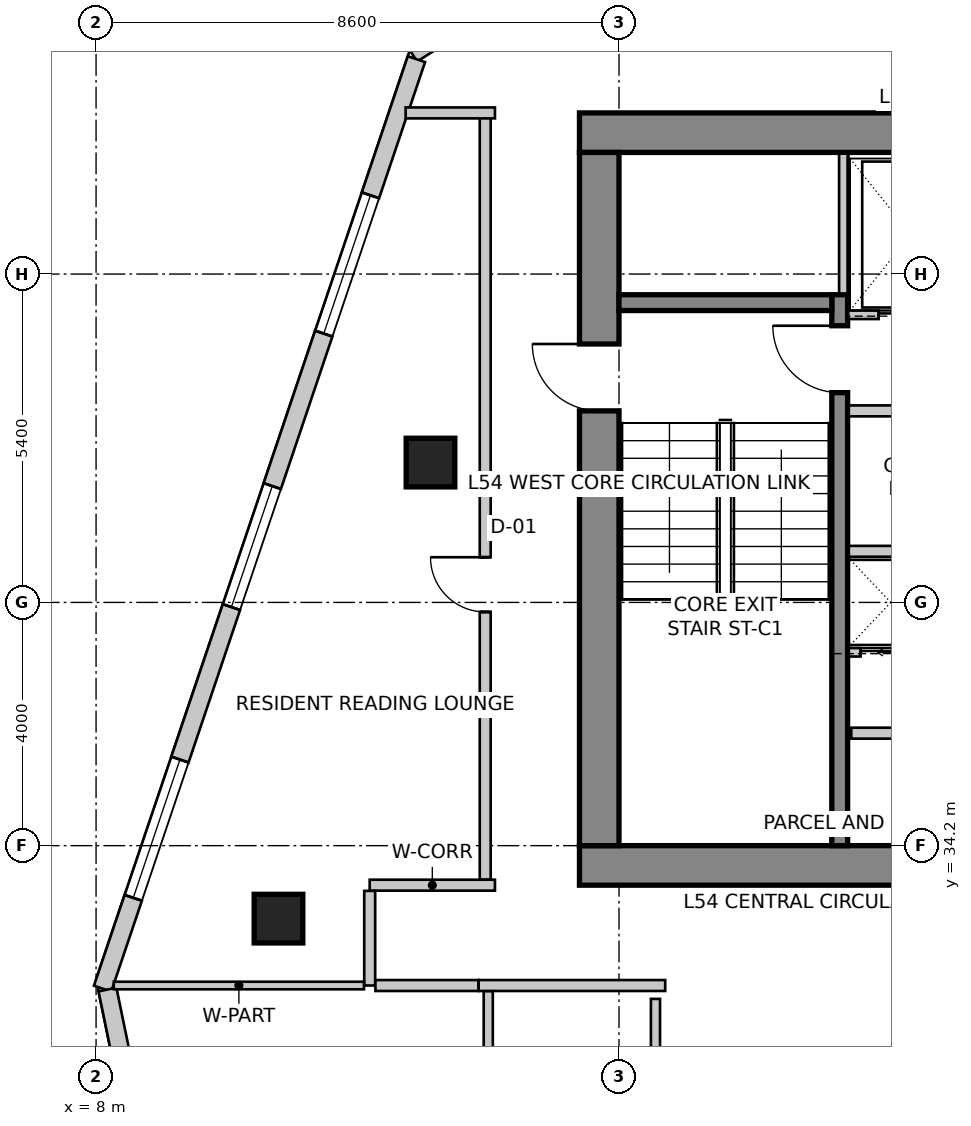
"""IFC4 building model, lengths in metres.
Left out: names, types, materials, properties, quantities, classifications, styles, units other than length and angle.
Written with IfcOpenShell. Run it as: python <this file> out.ifc"""

import sys

from ifc_helpers import new_model, si_unit, direction, frame, frame_2d, origin, origin_2d, place, context, subcontext, project, spatial, rectangle, extrude, source, transform, mapped, element, fill, save


model = new_model("IFC4")
c1 = context("Model", 3, precision=1e-05, world=origin(), true_north=direction((0.0, 1.0)))
c2 = subcontext(c1, "Body", "Model", "MODEL_VIEW")
j1 = project(units=[si_unit("LENGTHUNIT", "METRE"), si_unit("PLANEANGLEUNIT", "RADIAN")], contexts=[c1])
p1 = place(None, origin())
s1 = spatial("IfcSite", under=j1, at=p1, CompositionType="ELEMENT")
p2 = place(p1, origin())
s2 = spatial("IfcBuilding", under=s1, at=p2, CompositionType="ELEMENT")
p3 = place(p2, frame((0.0, 0.0, 214.9)))
s3 = spatial("IfcBuildingStorey", under=s2, at=p3, CompositionType="ELEMENT", Elevation=214.9)
p4 = place(p3, frame((15.95, 45.925, 0.0), z_axis=(0.0, 0.0, 1.0), x_axis=(1.0, 0.0, 0.0)))
e1 = element("IfcWall", 1, at=p4, inside=s3, PredefinedType="SHEAR", context=c2, shape_type="SweptSolid", body=[
    extrude(rectangle(XDim=15.7, YDim=0.65, at=frame_2d((7.85, 0.0))), origin(), (0.0, 0.0, 1.0), 3.5),
])
p5 = place(p3, frame((15.95, 33.875, 0.0), z_axis=(0.0, 0.0, 1.0), x_axis=(1.0, 0.0, 0.0)))
e2 = element("IfcWall", 2, at=p5, inside=s3, PredefinedType="SHEAR", context=c2, shape_type="SweptSolid", body=[
    extrude(rectangle(XDim=15.7, YDim=0.65, at=frame_2d((7.85, 0.0))), origin(), (0.0, 0.0, 1.0), 3.5),
])
m1 = source(origin(), c2, "Body", "SweptSolid", [
    extrude(rectangle(XDim=1.1, YDim=2.15, at=frame_2d((0.55, 1.075))), frame((0.0, 0.335, 0.0), z_axis=(0.0, -1.0, 0.0), x_axis=(1.0, 0.0, 0.0)), (0.0, 0.0, 1.0), 0.67),
])
p6 = place(p5, frame((10.08, 0.0, 0.0)))
e3 = element("IfcOpeningElement", 3, at=p6, cuts=e2, PredefinedType="OPENING", context=c2, shape_type="MappedRepresentation", body=[
    mapped(m1, transform((0.0, 0.0, 0.0), scale=1.0)),
])
p7 = place(p3, frame((16.275, 34.2, 0.0), z_axis=(0.0, 0.0, 1.0), x_axis=(0.0, 1.0, 0.0)))
e4 = element("IfcWall", 4, at=p7, inside=s3, PredefinedType="SHEAR", context=c2, shape_type="SweptSolid", body=[
    extrude(rectangle(XDim=11.4, YDim=0.65, at=frame_2d((5.7, 0.0))), origin(), (0.0, 0.0, 1.0), 3.5),
])
p8 = place(p7, frame((7.15, 0.0, 0.0)))
e5 = element("IfcOpeningElement", 5, at=p8, cuts=e4, PredefinedType="OPENING", context=c2, shape_type="MappedRepresentation", body=[
    mapped(m1, transform((0.0, 0.0, 0.0), scale=1.0)),
])
p9 = place(p3, frame((20.23, 34.2, 0.0), z_axis=(0.0, 0.0, 1.0), x_axis=(0.0, 1.0, 0.0)))
e6 = element("IfcWall", 6, at=p9, inside=s3, PredefinedType="SHEAR", context=c2, shape_type="SweptSolid", body=[
    extrude(rectangle(XDim=9.06, YDim=0.26, at=frame_2d((4.53, 0.0))), origin(), (0.0, 0.0, 1.0), 3.5),
])
m2 = source(origin(), c2, "Body", "SweptSolid", [
    extrude(rectangle(XDim=1.1, YDim=2.15, at=frame_2d((0.55, 1.075))), frame((0.0, 0.14, 0.0), z_axis=(0.0, -1.0, 0.0), x_axis=(1.0, 0.0, 0.0)), (0.0, 0.0, 1.0), 0.28),
])
p10 = place(p9, frame((7.45, 0.0, 0.0)))
e7 = element("IfcOpeningElement", 7, at=p10, cuts=e6, PredefinedType="OPENING", context=c2, shape_type="MappedRepresentation", body=[
    mapped(m2, transform((0.0, 0.0, 0.0), scale=1.0)),
])
p11 = place(p3, frame((16.6, 43.13, 0.0), z_axis=(0.0, 0.0, 1.0), x_axis=(1.0, 0.0, 0.0)))
e8 = element("IfcWall", 8, at=p11, inside=s3, PredefinedType="SHEAR", context=c2, shape_type="SweptSolid", body=[
    extrude(rectangle(XDim=3.5, YDim=0.26, at=frame_2d((1.75, 0.0))), origin(), (0.0, 0.0, 1.0), 3.5),
])
m3 = source(origin(), c2, "Body", "SweptSolid", [
    extrude(rectangle(XDim=0.8, YDim=0.8, at=origin_2d()), origin(), (0.0, 0.0, 1.0), 3.5),
])
for number, where, z_axis, x_axis in (
    (9, (11.0, 33.0, 0.0), (0.0, 0.0, 1.0), (1.0, 0.0, 0.0)),
    (10, (13.5, 40.5, 0.0), (0.0, 0.0, 1.0), (1.0, 0.0, 0.0)),
):
    element("IfcColumn", number, at=place(p3, frame(where, z_axis=z_axis, x_axis=x_axis)), inside=s3, PredefinedType="COLUMN", context=c2, shape_type="MappedRepresentation", body=[
        mapped(m3, transform((0.0, 0.0, 0.0), scale=1.0)),
    ])
p12 = place(p3, frame((21.874, 52.742, 0.0), z_axis=(0.0, 0.0, 1.0), x_axis=(-0.84365659959, -0.536883173482, 0.0)))
e11 = element("IfcWall", 11, at=p12, inside=s3, PredefinedType="SOLIDWALL", context=c2, shape_type="SweptSolid", body=[
    extrude(rectangle(XDim=10.283, YDim=0.3, at=frame_2d((5.142, 0.0))), origin(), (0.0, 0.0, 1.0), 3.25),
])
m4 = source(origin(), c2, "Body", "SweptSolid", [
    extrude(rectangle(XDim=2.1, YDim=2.0, at=frame_2d((1.05, 1.0))), frame((0.0, 0.16, 0.0), z_axis=(0.0, -1.0, 0.0), x_axis=(1.0, 0.0, 0.0)), (0.0, 0.0, 1.0), 0.32),
])
p13 = place(p12, frame((3.457, 0.0, 0.85)))
e12 = element("IfcOpeningElement", 12, at=p13, cuts=e11, PredefinedType="OPENING", context=c2, shape_type="MappedRepresentation", body=[
    mapped(m4, transform((0.0, 0.0, 0.0), scale=1.0)),
])
p14 = place(p3, frame((13.269, 47.134, 0.0), z_axis=(0.0, 0.0, 1.0), x_axis=(-0.319920776449, -0.947444297464, 0.0)))
e13 = element("IfcWall", 13, at=p14, inside=s3, PredefinedType="SOLIDWALL", context=c2, shape_type="SweptSolid", body=[
    extrude(rectangle(XDim=16.133, YDim=0.3, at=frame_2d((8.067, 0.0))), origin(), (0.0, 0.0, 1.0), 3.25),
])
m5 = source(origin(), c2, "Body", "SweptSolid", [
    extrude(rectangle(XDim=2.4, YDim=2.2, at=frame_2d((1.2, 1.1))), frame((0.0, 0.16, 0.0), z_axis=(0.0, -1.0, 0.0), x_axis=(1.0, 0.0, 0.0)), (0.0, 0.0, 1.0), 0.32),
])
p15 = place(p14, frame((2.363, 0.0, 0.85)))
e14 = element("IfcOpeningElement", 14, at=p15, cuts=e13, PredefinedType="OPENING", context=c2, shape_type="MappedRepresentation", body=[
    mapped(m5, transform((0.0, 0.0, 0.0), scale=1.0)),
])
p16 = place(p14, frame((7.41, 0.0, 0.85)))
e15 = element("IfcOpeningElement", 15, at=p16, cuts=e13, PredefinedType="OPENING", context=c2, shape_type="MappedRepresentation", body=[
    mapped(m4, transform((0.0, 0.0, 0.0), scale=1.0)),
])
p17 = place(p14, frame((12.157, 0.0, 0.85)))
e16 = element("IfcOpeningElement", 16, at=p17, cuts=e13, PredefinedType="OPENING", context=c2, shape_type="MappedRepresentation", body=[
    mapped(m5, transform((0.0, 0.0, 0.0), scale=1.0)),
])
p18 = place(p3, frame((8.188, 31.834, 0.0), z_axis=(0.0, 0.0, 1.0), x_axis=(0.202303475707, -0.979322880217, 0.0)))
e17 = element("IfcWall", 17, at=p18, inside=s3, PredefinedType="SOLIDWALL", context=c2, shape_type="SweptSolid", body=[
    extrude(rectangle(XDim=15.766, YDim=0.3, at=frame_2d((7.883, 0.0))), origin(), (0.0, 0.0, 1.0), 3.25),
])
p19 = place(p18, frame((1.407, 0.0, 0.85)))
e18 = element("IfcOpeningElement", 18, at=p19, cuts=e17, PredefinedType="OPENING", context=c2, shape_type="MappedRepresentation", body=[
    mapped(m4, transform((0.0, 0.0, 0.0), scale=1.0)),
])
p20 = place(p18, frame((6.194, 0.0, 0.85)))
e19 = element("IfcOpeningElement", 19, at=p20, cuts=e17, PredefinedType="OPENING", context=c2, shape_type="MappedRepresentation", body=[
    mapped(m4, transform((0.0, 0.0, 0.0), scale=1.0)),
])
p21 = place(p18, frame((11.054, 0.0, 0.85)))
e20 = element("IfcOpeningElement", 20, at=p21, cuts=e17, PredefinedType="OPENING", context=c2, shape_type="MappedRepresentation", body=[
    mapped(m4, transform((0.0, 0.0, 0.0), scale=1.0)),
])
p22 = place(p3, frame((20.37, 42.93, 0.0), z_axis=(0.0, 0.0, 1.0), x_axis=(1.0, 0.0, 0.0)))
e21 = element("IfcWall", 21, at=p22, inside=s3, PredefinedType="SOLIDWALL", context=c2, shape_type="SweptSolid", body=[
    extrude(rectangle(XDim=6.86, YDim=0.14, at=frame_2d((3.43, 0.0))), origin(), (0.0, 0.0, 1.0), 3.25),
])
m6 = source(origin(), c2, "Body", "SweptSolid", [
    extrude(rectangle(XDim=1.1, YDim=2.15, at=frame_2d((0.55, 1.075))), frame((0.0, 0.08, 0.0), z_axis=(0.0, -1.0, 0.0), x_axis=(1.0, 0.0, 0.0)), (0.0, 0.0, 1.0), 0.16),
])
p23 = place(p22, frame((0.5, 0.0, 0.0)))
e22 = element("IfcOpeningElement", 22, at=p23, cuts=e21, PredefinedType="OPENING", context=c2, shape_type="MappedRepresentation", body=[
    mapped(m6, transform((0.0, 0.0, 0.0), scale=1.0)),
])
p24 = place(p22, frame((2.7, 0.0, 0.0)))
e23 = element("IfcOpeningElement", 23, at=p24, cuts=e21, PredefinedType="OPENING", context=c2, shape_type="MappedRepresentation", body=[
    mapped(m6, transform((0.0, 0.0, 0.0), scale=1.0)),
])
p25 = place(p22, frame((5.1, 0.0, 0.0)))
e24 = element("IfcOpeningElement", 24, at=p25, cuts=e21, PredefinedType="OPENING", context=c2, shape_type="MappedRepresentation", body=[
    mapped(m6, transform((0.0, 0.0, 0.0), scale=1.0)),
])
p26 = place(p3, frame((20.29, 43.28, 0.0), z_axis=(0.0, 0.0, 1.0), x_axis=(0.0, 1.0, 0.0)))
e25 = element("IfcWall", 25, at=p26, inside=s3, PredefinedType="SOLIDWALL", context=c2, shape_type="SweptSolid", body=[
    extrude(rectangle(XDim=2.3, YDim=0.14, at=frame_2d((1.15, 0.0))), origin(), (0.0, 0.0, 1.0), 3.25),
])
p27 = place(p3, frame((20.38, 37.38, 0.0), z_axis=(0.0, 0.0, 1.0), x_axis=(1.0, 0.0, 0.0)))
e26 = element("IfcWall", 26, at=p27, inside=s3, PredefinedType="SOLIDWALL", context=c2, shape_type="SweptSolid", body=[
    extrude(rectangle(XDim=5.75, YDim=0.14, at=frame_2d((2.875, 0.0))), origin(), (0.0, 0.0, 1.0), 3.25),
])
m7 = source(origin(), c2, "Body", "SweptSolid", [
    extrude(rectangle(XDim=1.0, YDim=2.15, at=frame_2d((0.5, 1.075))), frame((0.0, 0.08, 0.0), z_axis=(0.0, -1.0, 0.0), x_axis=(1.0, 0.0, 0.0)), (0.0, 0.0, 1.0), 0.16),
])
p28 = place(p27, frame((0.19, 0.0, 0.0)))
e27 = element("IfcOpeningElement", 27, at=p28, cuts=e26, PredefinedType="OPENING", context=c2, shape_type="MappedRepresentation", body=[
    mapped(m7, transform((0.0, 0.0, 0.0), scale=1.0)),
])
p29 = place(p3, frame((20.38, 39.04, 0.0), z_axis=(0.0, 0.0, 1.0), x_axis=(1.0, 0.0, 0.0)))
e28 = element("IfcWall", 28, at=p29, inside=s3, PredefinedType="SOLIDWALL", context=c2, shape_type="SweptSolid", body=[
    extrude(rectangle(XDim=5.75, YDim=0.18, at=frame_2d((2.875, 0.0))), origin(), (0.0, 0.0, 1.0), 3.25),
])
p30 = place(p3, frame((24.81, 41.35, 0.0), z_axis=(0.0, 0.0, 1.0), x_axis=(-1.0, 0.0, 0.0)))
e29 = element("IfcWall", 29, at=p30, inside=s3, PredefinedType="PARTITIONING", context=c2, shape_type="SweptSolid", body=[
    extrude(rectangle(XDim=4.43, YDim=0.18, at=frame_2d((2.215, 0.0))), origin(), (0.0, 0.0, 1.0), 3.25),
])
p31 = place(p3, frame((20.42, 36.05, 0.0), z_axis=(0.0, 0.0, 1.0), x_axis=(1.0, 0.0, 0.0)))
e30 = element("IfcWall", 30, at=p31, inside=s3, PredefinedType="PARTITIONING", context=c2, shape_type="SweptSolid", body=[
    extrude(rectangle(XDim=5.46, YDim=0.18, at=frame_2d((2.73, 0.0))), origin(), (0.0, 0.0, 1.0), 3.25),
])
m8 = source(origin(), c2, "Body", "SweptSolid", [
    extrude(rectangle(XDim=0.9, YDim=2.15, at=frame_2d((0.45, 1.075))), frame((0.0, 0.1, 0.0), z_axis=(0.0, -1.0, 0.0), x_axis=(1.0, 0.0, 0.0)), (0.0, 0.0, 1.0), 0.2),
])
p32 = place(p31, frame((2.219, 0.0, 0.0)))
e31 = element("IfcOpeningElement", 31, at=p32, cuts=e30, PredefinedType="OPENING", context=c2, shape_type="MappedRepresentation", body=[
    mapped(m8, transform((0.0, 0.0, 0.0), scale=1.0)),
])
p33 = place(p3, frame((12.5, 33.55, 0.0), z_axis=(0.0, 0.0, 1.0), x_axis=(1.0, 0.0, 0.0)))
e32 = element("IfcWall", 32, at=p33, inside=s3, PredefinedType="PARTITIONING", context=c2, shape_type="SweptSolid", body=[
    extrude(rectangle(XDim=2.06, YDim=0.18, at=frame_2d((1.03, 0.0))), origin(), (0.0, 0.0, 1.0), 3.25),
])
p34 = place(p3, frame((12.5, 31.9, 0.0), z_axis=(0.0, 0.0, 1.0), x_axis=(0.0, 1.0, 0.0)))
e33 = element("IfcWall", 33, at=p34, inside=s3, PredefinedType="PARTITIONING", context=c2, shape_type="SweptSolid", body=[
    extrude(rectangle(XDim=1.556, YDim=0.18, at=frame_2d((0.778, 0.0))), origin(), (0.0, 0.0, 1.0), 2.835),
])
p35 = place(p3, frame((17.36, 31.9, 0.0), z_axis=(0.0, 0.0, 1.0), x_axis=(-1.0, 0.0, 0.0)))
e34 = element("IfcWall", 34, at=p35, inside=s3, PredefinedType="PARTITIONING", context=c2, shape_type="SweptSolid", body=[
    extrude(rectangle(XDim=3.07, YDim=0.18, at=frame_2d((1.535, 0.0))), origin(), (0.0, 0.0, 1.0), 2.835),
])
p36 = place(p3, frame((14.288, 31.9, 0.0), z_axis=(0.0, 0.0, 1.0), x_axis=(-1.0, 0.0, 0.0)))
e35 = element("IfcWall", 35, at=p36, inside=s3, PredefinedType="PARTITIONING", context=c2, shape_type="SweptSolid", body=[
    extrude(rectangle(XDim=1.694, YDim=0.18, at=frame_2d((0.847, 0.0))), origin(), (0.0, 0.0, 1.0), 2.835),
])
p37 = place(p3, frame((14.4, 33.644, 0.0), z_axis=(0.0, 0.0, 1.0), x_axis=(0.0, 1.0, 0.0)))
e36 = element("IfcWall", 36, at=p37, inside=s3, PredefinedType="PARTITIONING", context=c2, shape_type="SweptSolid", body=[
    extrude(rectangle(XDim=12.606, YDim=0.18, at=frame_2d((6.303, 0.0))), origin(), (0.0, 0.0, 1.0), 3.25),
])
p38 = place(p37, frame((4.399, 0.0, 0.0)))
e37 = element("IfcOpeningElement", 37, at=p38, cuts=e36, PredefinedType="OPENING", context=c2, shape_type="MappedRepresentation", body=[
    mapped(m8, transform((0.0, 0.0, 0.0), scale=1.0)),
])
p39 = place(p3, frame((14.56, 46.25, 0.0), z_axis=(0.0, 0.0, 1.0), x_axis=(-1.0, 0.0, 0.0)))
e38 = element("IfcWall", 38, at=p39, inside=s3, PredefinedType="PARTITIONING", context=c2, shape_type="SweptSolid", body=[
    extrude(rectangle(XDim=1.469, YDim=0.18, at=frame_2d((0.734, 0.0))), origin(), (0.0, 0.0, 1.0), 3.25),
])
p40 = place(p3, frame((12.406, 31.9, 0.0), z_axis=(0.0, 0.0, 1.0), x_axis=(-1.0, 0.0, 0.0)))
e39 = element("IfcWall", 39, at=p40, inside=s3, PredefinedType="PARTITIONING", context=c2, shape_type="SweptSolid", body=[
    extrude(rectangle(XDim=4.115, YDim=0.125, at=frame_2d((2.057, 0.0))), origin(), (0.0, 0.0, 1.0), 2.542),
])
p41 = place(p3, frame((14.45, 27.221, 0.0), z_axis=(0.0, 0.0, 1.0), x_axis=(0.0, 1.0, 0.0)))
e40 = element("IfcWall", 40, at=p41, inside=s3, PredefinedType="PARTITIONING", context=c2, shape_type="SweptSolid", body=[
    extrude(rectangle(XDim=4.585, YDim=0.15, at=frame_2d((2.292, 0.0))), origin(), (0.0, 0.0, 1.0), 2.766),
])
p42 = place(p3, frame((17.2, 31.68, 0.0), z_axis=(0.0, 0.0, 1.0), x_axis=(0.0, -1.0, 0.0)))
e41 = element("IfcWall", 41, at=p42, inside=s3, PredefinedType="PARTITIONING", context=c2, shape_type="SweptSolid", body=[
    extrude(rectangle(XDim=4.318, YDim=0.15, at=frame_2d((2.159, 0.0))), origin(), (0.0, 0.0, 1.0), 2.766),
])
m9 = source(origin(), c2, "Body", "SweptSolid", [
    extrude(rectangle(XDim=2.4, YDim=2.2, at=frame_2d((1.2, 1.1))), frame((0.0, -0.015, 0.0), z_axis=(0.0, -1.0, 0.0), x_axis=(1.0, 0.0, 0.0)), (0.0, 0.0, 1.0), 0.06),
])
p43 = place(p15, origin())
e42 = element("IfcWindow", 42, at=p43, inside=s3, PartitioningType="SINGLE_PANEL", PredefinedType="WINDOW", context=c2, shape_type="MappedRepresentation", body=[
    mapped(m9, transform((0.0, 0.0, 0.0), scale=1.0)),
])
fill(e14, e42)
m10 = source(origin(), c2, "Body", "SweptSolid", [
    extrude(rectangle(XDim=2.1, YDim=2.0, at=frame_2d((1.05, 1.0))), frame((0.0, -0.015, 0.0), z_axis=(0.0, -1.0, 0.0), x_axis=(1.0, 0.0, 0.0)), (0.0, 0.0, 1.0), 0.06),
])
p44 = place(p16, origin())
e43 = element("IfcWindow", 43, at=p44, inside=s3, PartitioningType="SINGLE_PANEL", PredefinedType="WINDOW", context=c2, shape_type="MappedRepresentation", body=[
    mapped(m10, transform((0.0, 0.0, 0.0), scale=1.0)),
])
fill(e15, e43)
p45 = place(p17, origin())
e44 = element("IfcWindow", 44, at=p45, inside=s3, PartitioningType="SINGLE_PANEL", PredefinedType="WINDOW", context=c2, shape_type="MappedRepresentation", body=[
    mapped(m9, transform((0.0, 0.0, 0.0), scale=1.0)),
])
fill(e16, e44)
m11 = source(origin(), c2, "Body", "SweptSolid", [
    extrude(rectangle(XDim=1.1, YDim=2.15, at=frame_2d((0.55, 1.075))), frame((0.0, 0.025, 0.0), z_axis=(0.0, -1.0, 0.0), x_axis=(1.0, 0.0, 0.0)), (0.0, 0.0, 1.0), 0.05),
])
p46 = place(p23, origin())
e45 = element("IfcDoor", 45, at=p46, inside=s3, OperationType="SLIDING_TO_LEFT", PredefinedType="DOOR", context=c2, shape_type="MappedRepresentation", body=[
    mapped(m11, transform((0.0, 0.0, 0.0), scale=1.0)),
])
fill(e22, e45)
m12 = source(origin(), c2, "Body", "SweptSolid", [
    extrude(rectangle(XDim=1.0, YDim=2.15, at=frame_2d((0.5, 1.075))), frame((0.0, 0.025, 0.0), z_axis=(0.0, -1.0, 0.0), x_axis=(1.0, 0.0, 0.0)), (0.0, 0.0, 1.0), 0.05),
])
p47 = place(p28, origin())
e46 = element("IfcDoor", 46, at=p47, inside=s3, OperationType="SLIDING_TO_LEFT", PredefinedType="DOOR", context=c2, shape_type="MappedRepresentation", body=[
    mapped(m12, transform((0.0, 0.0, 0.0), scale=1.0)),
])
fill(e27, e46)
m13 = source(origin(), c2, "Body", "SweptSolid", [
    extrude(rectangle(XDim=1.1, YDim=2.15, at=frame_2d((0.55, 1.075))), frame((0.0, 0.025, 0.0), z_axis=(0.0, -1.0, 0.0), x_axis=(1.0, 0.0, 0.0)), (0.0, 0.0, 1.0), 0.05),
])
p48 = place(p10, origin())
e47 = element("IfcDoor", 47, at=p48, inside=s3, OperationType="SINGLE_SWING_RIGHT", PredefinedType="DOOR", context=c2, shape_type="MappedRepresentation", body=[
    mapped(m13, transform((0.0, 0.0, 0.0), scale=1.0)),
])
fill(e7, e47)
p49 = place(p8, origin())
e48 = element("IfcDoor", 48, at=p49, inside=s3, OperationType="SINGLE_SWING_RIGHT", PredefinedType="DOOR", context=c2, shape_type="MappedRepresentation", body=[
    mapped(m13, transform((0.0, 0.0, 0.0), scale=1.0)),
])
fill(e5, e48)
m14 = source(origin(), c2, "Body", "SweptSolid", [
    extrude(rectangle(XDim=0.9, YDim=2.15, at=frame_2d((0.45, 1.075))), frame((0.0, 0.025, 0.0), z_axis=(0.0, -1.0, 0.0), x_axis=(1.0, 0.0, 0.0)), (0.0, 0.0, 1.0), 0.05),
])
p50 = place(p38, origin())
e49 = element("IfcDoor", 49, at=p50, inside=s3, OperationType="SINGLE_SWING_RIGHT", PredefinedType="DOOR", context=c2, shape_type="MappedRepresentation", body=[
    mapped(m14, transform((0.0, 0.0, 0.0), scale=1.0)),
])
fill(e37, e49)
save(model, sys.argv[1])
